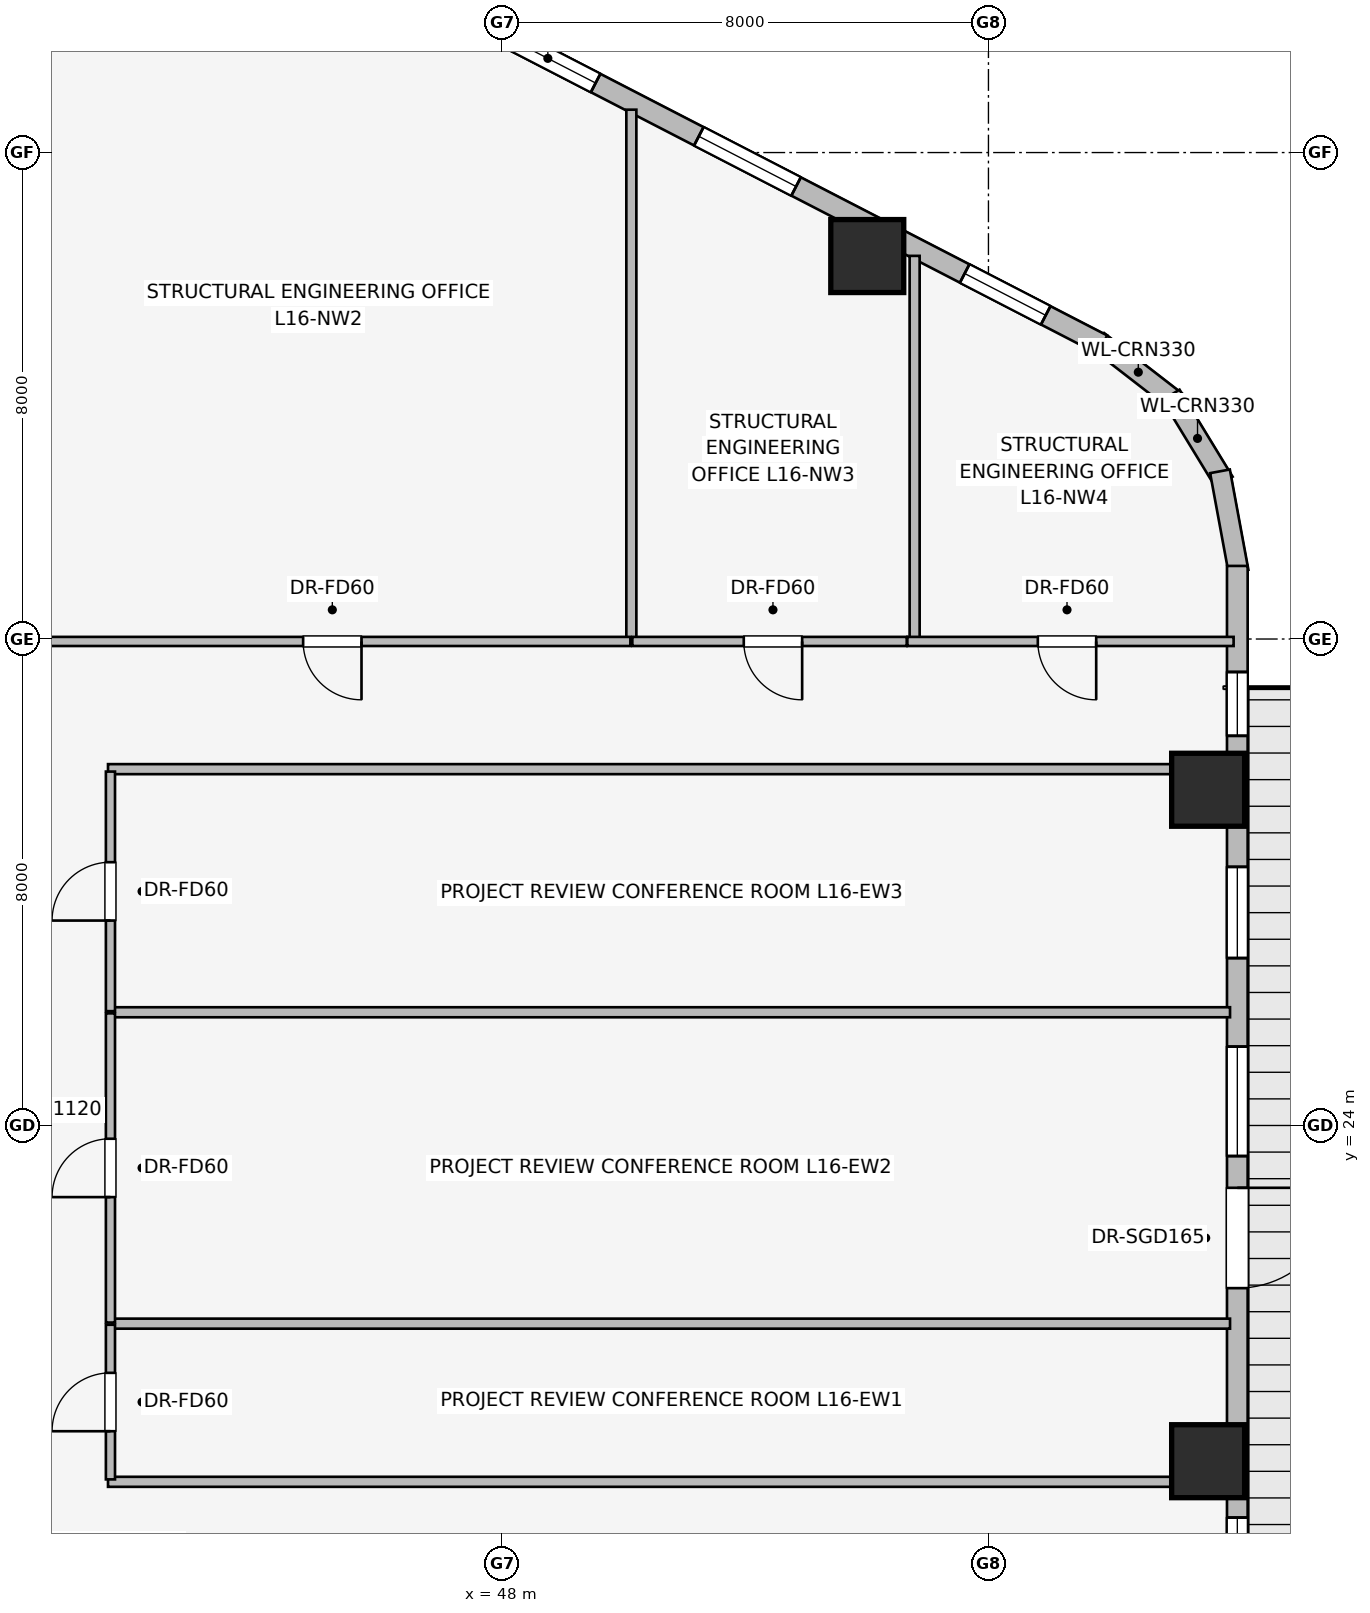
"""IFC4 building model, lengths in metres.
Left out: names, types, materials, properties, quantities, classifications, styles, units other than length and angle.
Written with IfcOpenShell. Run it as: python <this file> out.ifc"""

import sys

from ifc_helpers import new_model, si_unit, direction, frame, frame_2d, origin, origin_2d, place, context, subcontext, project, spatial, rectangle, extrude, element, fill, save


model = new_model("IFC4")
c1 = context("Model", 3, precision=1e-05, world=origin(), true_north=direction((0.0, 1.0)))
c2 = subcontext(c1, "Body", "Model", "MODEL_VIEW")
j1 = project(units=[si_unit("LENGTHUNIT", "METRE"), si_unit("PLANEANGLEUNIT", "RADIAN")], contexts=[c1])
p1 = place(None, origin())
s1 = spatial("IfcSite", under=j1, at=p1, CompositionType="ELEMENT")
p2 = place(p1, origin())
s2 = spatial("IfcBuilding", under=s1, at=p2, CompositionType="ELEMENT")
p3 = place(p2, frame((0.0, 0.0, 63.5)))
s3 = spatial("IfcBuildingStorey", under=s2, at=p3, CompositionType="ELEMENT", Elevation=63.5)
for number, where, z_axis, x_axis in (
    (1, (54.007, 38.298, 0.0), (0.0, 0.0, 1.0), (1.0, 0.0, 0.0)),
    (2, (59.613, 18.479, 0.0), (0.0, 0.0, 1.0), (1.0, 0.0, 0.0)),
    (3, (59.613, 29.521, 0.0), (0.0, 0.0, 1.0), (1.0, 0.0, 0.0)),
):
    element("IfcColumn", number, at=place(p3, frame(where, z_axis=z_axis, x_axis=x_axis)), inside=s3, PredefinedType="COLUMN", context=c2, shape_type="SweptSolid", body=[
        extrude(rectangle(XDim=1.2, YDim=1.2, at=origin_2d()), origin(), (0.0, 0.0, 1.0), 3.65),
    ])
p4 = place(p3, frame((57.802, 36.901, 0.0), z_axis=(0.0, 0.0, 1.0), x_axis=(0.790691856293, -0.61221433207, 0.0)))
e4 = element("IfcWall", 4, at=p4, inside=s3, PredefinedType="STANDARD", context=c2, shape_type="SweptSolid", body=[
    extrude(rectangle(XDim=1.676, YDim=0.33, at=frame_2d((0.838, 0.0))), origin(), (0.0, 0.0, 1.0), 3.39),
])
p5 = place(p3, frame((59.002, 36.015, 0.0), z_axis=(0.0, 0.0, 1.0), x_axis=(0.520584129191, -0.853810379671, 0.0)))
e5 = element("IfcWall", 5, at=p5, inside=s3, PredefinedType="STANDARD", context=c2, shape_type="SweptSolid", body=[
    extrude(rectangle(XDim=1.677, YDim=0.33, at=frame_2d((0.838, 0.0))), origin(), (0.0, 0.0, 1.0), 3.39),
])
p6 = place(p3, frame((59.808, 34.758, 0.0), z_axis=(0.0, 0.0, 1.0), x_axis=(0.181714143354, -0.983351397063, 0.0)))
e6 = element("IfcWall", 6, at=p6, inside=s3, PredefinedType="STANDARD", context=c2, shape_type="SweptSolid", body=[
    extrude(rectangle(XDim=1.678, YDim=0.33, at=frame_2d((0.839, 0.0))), origin(), (0.0, 0.0, 1.0), 3.39),
])
p7 = place(p3, frame((39.631, 46.257, 0.0), z_axis=(0.0, 0.0, 1.0), x_axis=(0.888634413993, -0.458616264721, 0.0)))
e7 = element("IfcWall", 7, at=p7, inside=s3, PredefinedType="STANDARD", context=c2, shape_type="SweptSolid", body=[
    extrude(rectangle(XDim=20.531, YDim=0.34, at=frame_2d((10.266, 0.0))), origin(), (0.0, 0.0, 1.0), 2.684),
])
p8 = place(p7, frame((1.367, 0.0, 0.75)))
e8 = element("IfcOpeningElement", 8, at=p8, cuts=e7, PredefinedType="OPENING", context=c2, shape_type="SweptSolid", body=[
    extrude(rectangle(XDim=1.8, YDim=1.5, at=frame_2d((0.9, 0.75))), frame((0.0, 0.18, 0.0), z_axis=(0.0, -1.0, 0.0), x_axis=(1.0, 0.0, 0.0)), (0.0, 0.0, 1.0), 0.36),
])
p9 = place(p7, frame((5.207, 0.0, 0.75)))
e9 = element("IfcOpeningElement", 9, at=p9, cuts=e7, PredefinedType="OPENING", context=c2, shape_type="SweptSolid", body=[
    extrude(rectangle(XDim=1.5, YDim=1.5, at=frame_2d((0.75, 0.75))), frame((0.0, 0.18, 0.0), z_axis=(0.0, -1.0, 0.0), x_axis=(1.0, 0.0, 0.0)), (0.0, 0.0, 1.0), 0.36),
])
p10 = place(p7, frame((7.429, 0.0, 0.75)))
e10 = element("IfcOpeningElement", 10, at=p10, cuts=e7, PredefinedType="OPENING", context=c2, shape_type="SweptSolid", body=[
    extrude(rectangle(XDim=1.5, YDim=1.5, at=frame_2d((0.75, 0.75))), frame((0.0, 0.18, 0.0), z_axis=(0.0, -1.0, 0.0), x_axis=(1.0, 0.0, 0.0)), (0.0, 0.0, 1.0), 0.36),
])
p11 = place(p7, frame((9.65, 0.0, 0.75)))
e11 = element("IfcOpeningElement", 11, at=p11, cuts=e7, PredefinedType="OPENING", context=c2, shape_type="SweptSolid", body=[
    extrude(rectangle(XDim=1.5, YDim=1.5, at=frame_2d((0.75, 0.75))), frame((0.0, 0.18, 0.0), z_axis=(0.0, -1.0, 0.0), x_axis=(1.0, 0.0, 0.0)), (0.0, 0.0, 1.0), 0.36),
])
p12 = place(p7, frame((13.06, 0.0, 0.75)))
e12 = element("IfcOpeningElement", 12, at=p12, cuts=e7, PredefinedType="OPENING", context=c2, shape_type="SweptSolid", body=[
    extrude(rectangle(XDim=1.8, YDim=1.5, at=frame_2d((0.9, 0.75))), frame((0.0, 0.18, 0.0), z_axis=(0.0, -1.0, 0.0), x_axis=(1.0, 0.0, 0.0)), (0.0, 0.0, 1.0), 0.36),
])
p13 = place(p7, frame((17.98, 0.0, 0.75)))
e13 = element("IfcOpeningElement", 13, at=p13, cuts=e7, PredefinedType="OPENING", context=c2, shape_type="SweptSolid", body=[
    extrude(rectangle(XDim=1.5, YDim=1.5, at=frame_2d((0.75, 0.75))), frame((0.0, 0.18, 0.0), z_axis=(0.0, -1.0, 0.0), x_axis=(1.0, 0.0, 0.0)), (0.0, 0.0, 1.0), 0.36),
])
p14 = place(p3, frame((60.093, 33.202, 0.0), z_axis=(0.0, 0.0, 1.0), x_axis=(0.0, -1.0, 0.0)))
e14 = element("IfcWall", 14, at=p14, inside=s3, PredefinedType="STANDARD", context=c2, shape_type="SweptSolid", body=[
    extrude(rectangle(XDim=18.404, YDim=0.34, at=frame_2d((9.202, 0.0))), origin(), (0.0, 0.0, 1.0), 2.684),
])
p15 = place(p14, frame((10.227, 0.0, 0.0)))
e15 = element("IfcOpeningElement", 15, at=p15, cuts=e14, PredefinedType="OPENING", context=c2, shape_type="SweptSolid", body=[
    extrude(rectangle(XDim=1.65, YDim=2.25, at=frame_2d((0.825, 1.125))), frame((0.0, 0.18, 0.0), z_axis=(0.0, -1.0, 0.0), x_axis=(1.0, 0.0, 0.0)), (0.0, 0.0, 1.0), 0.36),
])
p16 = place(p14, frame((1.744, 0.0, 0.75)))
e16 = element("IfcOpeningElement", 16, at=p16, cuts=e14, PredefinedType="OPENING", context=c2, shape_type="SweptSolid", body=[
    extrude(rectangle(XDim=1.05, YDim=1.4, at=frame_2d((0.525, 0.7))), frame((0.0, 0.18, 0.0), z_axis=(0.0, -1.0, 0.0), x_axis=(1.0, 0.0, 0.0)), (0.0, 0.0, 1.0), 0.36),
])
p17 = place(p14, frame((4.949, 0.0, 0.75)))
e17 = element("IfcOpeningElement", 17, at=p17, cuts=e14, PredefinedType="OPENING", context=c2, shape_type="SweptSolid", body=[
    extrude(rectangle(XDim=1.5, YDim=1.5, at=frame_2d((0.75, 0.75))), frame((0.0, 0.18, 0.0), z_axis=(0.0, -1.0, 0.0), x_axis=(1.0, 0.0, 0.0)), (0.0, 0.0, 1.0), 0.36),
])
p18 = place(p14, frame((7.905, 0.0, 0.75)))
e18 = element("IfcOpeningElement", 18, at=p18, cuts=e14, PredefinedType="OPENING", context=c2, shape_type="SweptSolid", body=[
    extrude(rectangle(XDim=1.8, YDim=1.5, at=frame_2d((0.9, 0.75))), frame((0.0, 0.18, 0.0), z_axis=(0.0, -1.0, 0.0), x_axis=(1.0, 0.0, 0.0)), (0.0, 0.0, 1.0), 0.36),
])
p19 = place(p14, frame((15.65, 0.0, 0.75)))
e19 = element("IfcOpeningElement", 19, at=p19, cuts=e14, PredefinedType="OPENING", context=c2, shape_type="SweptSolid", body=[
    extrude(rectangle(XDim=1.05, YDim=1.4, at=frame_2d((0.525, 0.7))), frame((0.0, 0.18, 0.0), z_axis=(0.0, -1.0, 0.0), x_axis=(1.0, 0.0, 0.0)), (0.0, 0.0, 1.0), 0.36),
])
p20 = place(p3, frame((50.127, 31.97, 0.0), z_axis=(0.0, 0.0, 1.0), x_axis=(0.0, 1.0, 0.0)))
e20 = element("IfcWall", 20, at=p20, inside=s3, PredefinedType="PARTITIONING", context=c2, shape_type="SweptSolid", body=[
    extrude(rectangle(XDim=8.735, YDim=0.165, at=frame_2d((4.368, 0.0))), origin(), (0.0, 0.0, 1.0), 3.39),
])
p21 = place(p3, frame((54.786, 31.97, 0.0), z_axis=(0.0, 0.0, 1.0), x_axis=(0.0, 1.0, 0.0)))
e21 = element("IfcWall", 21, at=p21, inside=s3, PredefinedType="PARTITIONING", context=c2, shape_type="SweptSolid", body=[
    extrude(rectangle(XDim=6.331, YDim=0.165, at=frame_2d((3.166, 0.0))), origin(), (0.0, 0.0, 1.0), 3.39),
])
p22 = place(p3, frame((50.111, 31.96, 0.0), z_axis=(0.0, 0.0, 1.0), x_axis=(-1.0, 0.0, 0.0)))
e22 = element("IfcWall", 22, at=p22, inside=s3, PredefinedType="PARTITIONING", context=c2, shape_type="SweptSolid", body=[
    extrude(rectangle(XDim=9.689, YDim=0.15, at=frame_2d((4.844, 0.0))), origin(), (0.0, 0.0, 1.0), 3.39),
])
p23 = place(p22, frame((4.422, 0.0, 0.0)))
e23 = element("IfcOpeningElement", 23, at=p23, cuts=e22, PredefinedType="OPENING", context=c2, shape_type="SweptSolid", body=[
    extrude(rectangle(XDim=0.96, YDim=2.0, at=frame_2d((0.48, 1.0))), frame((0.0, 0.085, 0.0), z_axis=(0.0, -1.0, 0.0), x_axis=(1.0, 0.0, 0.0)), (0.0, 0.0, 1.0), 0.17),
])
p24 = place(p3, frame((54.656, 31.96, 0.0), z_axis=(0.0, 0.0, 1.0), x_axis=(-1.0, 0.0, 0.0)))
e24 = element("IfcWall", 24, at=p24, inside=s3, PredefinedType="PARTITIONING", context=c2, shape_type="SweptSolid", body=[
    extrude(rectangle(XDim=4.513, YDim=0.15, at=frame_2d((2.256, 0.0))), origin(), (0.0, 0.0, 1.0), 3.39),
])
p25 = place(p24, frame((1.72, 0.0, 0.0)))
e25 = element("IfcOpeningElement", 25, at=p25, cuts=e24, PredefinedType="OPENING", context=c2, shape_type="SweptSolid", body=[
    extrude(rectangle(XDim=0.96, YDim=2.0, at=frame_2d((0.48, 1.0))), frame((0.0, 0.085, 0.0), z_axis=(0.0, -1.0, 0.0), x_axis=(1.0, 0.0, 0.0)), (0.0, 0.0, 1.0), 0.17),
])
p26 = place(p3, frame((60.032, 31.96, 0.0), z_axis=(0.0, 0.0, 1.0), x_axis=(-1.0, 0.0, 0.0)))
e26 = element("IfcWall", 26, at=p26, inside=s3, PredefinedType="PARTITIONING", context=c2, shape_type="SweptSolid", body=[
    extrude(rectangle(XDim=5.366, YDim=0.15, at=frame_2d((2.683, 0.0))), origin(), (0.0, 0.0, 1.0), 3.39),
])
p27 = place(p26, frame((2.26, 0.0, 0.0)))
e27 = element("IfcOpeningElement", 27, at=p27, cuts=e26, PredefinedType="OPENING", context=c2, shape_type="SweptSolid", body=[
    extrude(rectangle(XDim=0.96, YDim=2.0, at=frame_2d((0.48, 1.0))), frame((0.0, 0.085, 0.0), z_axis=(0.0, -1.0, 0.0), x_axis=(1.0, 0.0, 0.0)), (0.0, 0.0, 1.0), 0.17),
])
for number, where, z_axis, x_axis in (
    (28, (41.52, 18.14, 0.0), (0.0, 0.0, 1.0), (1.0, 0.0, 0.0)),
    (29, (41.52, 29.86, 0.0), (0.0, 0.0, 1.0), (1.0, 0.0, 0.0)),
):
    element("IfcWall", number, at=place(p3, frame(where, z_axis=z_axis, x_axis=x_axis)), inside=s3, PredefinedType="PARTITIONING", context=c2, shape_type="SweptSolid", body=[
        extrude(rectangle(XDim=18.453, YDim=0.165, at=frame_2d((9.227, 0.0))), origin(), (0.0, 0.0, 1.0), 3.39),
    ])
for number, where, z_axis, x_axis in (
    (30, (41.59, 20.741, 0.0), (0.0, 0.0, 1.0), (1.0, 0.0, 0.0)),
    (31, (41.59, 25.862, 0.0), (0.0, 0.0, 1.0), (1.0, 0.0, 0.0)),
):
    element("IfcWall", number, at=place(p3, frame(where, z_axis=z_axis, x_axis=x_axis)), inside=s3, PredefinedType="PARTITIONING", context=c2, shape_type="SweptSolid", body=[
        extrude(rectangle(XDim=18.383, YDim=0.165, at=frame_2d((9.191, 0.0))), origin(), (0.0, 0.0, 1.0), 3.39),
    ])
p28 = place(p3, frame((41.56, 18.18, 0.0), z_axis=(0.0, 0.0, 1.0), x_axis=(0.0, 1.0, 0.0)))
e32 = element("IfcWall", 32, at=p28, inside=s3, PredefinedType="PARTITIONING", context=c2, shape_type="SweptSolid", body=[
    extrude(rectangle(XDim=2.543, YDim=0.15, at=frame_2d((1.271, 0.0))), origin(), (0.0, 0.0, 1.0), 3.39),
])
p29 = place(p28, frame((0.792, 0.0, 0.0)))
e33 = element("IfcOpeningElement", 33, at=p29, cuts=e32, PredefinedType="OPENING", context=c2, shape_type="SweptSolid", body=[
    extrude(rectangle(XDim=0.96, YDim=2.0, at=frame_2d((0.48, 1.0))), frame((0.0, 0.085, 0.0), z_axis=(0.0, -1.0, 0.0), x_axis=(1.0, 0.0, 0.0)), (0.0, 0.0, 1.0), 0.17),
])
p30 = place(p3, frame((41.56, 20.759, 0.0), z_axis=(0.0, 0.0, 1.0), x_axis=(0.0, 1.0, 0.0)))
e34 = element("IfcWall", 34, at=p30, inside=s3, PredefinedType="PARTITIONING", context=c2, shape_type="SweptSolid", body=[
    extrude(rectangle(XDim=5.085, YDim=0.15, at=frame_2d((2.542, 0.0))), origin(), (0.0, 0.0, 1.0), 3.39),
])
p31 = place(p30, frame((2.063, 0.0, 0.0)))
e35 = element("IfcOpeningElement", 35, at=p31, cuts=e34, PredefinedType="OPENING", context=c2, shape_type="SweptSolid", body=[
    extrude(rectangle(XDim=0.96, YDim=2.0, at=frame_2d((0.48, 1.0))), frame((0.0, 0.085, 0.0), z_axis=(0.0, -1.0, 0.0), x_axis=(1.0, 0.0, 0.0)), (0.0, 0.0, 1.0), 0.17),
])
p32 = place(p3, frame((41.56, 25.88, 0.0), z_axis=(0.0, 0.0, 1.0), x_axis=(0.0, 1.0, 0.0)))
e36 = element("IfcWall", 36, at=p32, inside=s3, PredefinedType="PARTITIONING", context=c2, shape_type="SweptSolid", body=[
    extrude(rectangle(XDim=3.94, YDim=0.15, at=frame_2d((1.97, 0.0))), origin(), (0.0, 0.0, 1.0), 3.39),
])
p33 = place(p32, frame((1.49, 0.0, 0.0)))
e37 = element("IfcOpeningElement", 37, at=p33, cuts=e36, PredefinedType="OPENING", context=c2, shape_type="SweptSolid", body=[
    extrude(rectangle(XDim=0.96, YDim=2.0, at=frame_2d((0.48, 1.0))), frame((0.0, 0.085, 0.0), z_axis=(0.0, -1.0, 0.0), x_axis=(1.0, 0.0, 0.0)), (0.0, 0.0, 1.0), 0.17),
])
p34 = place(p11, origin())
e38 = element("IfcWindow", 38, at=p34, inside=s3, PartitioningType="SINGLE_PANEL", PredefinedType="WINDOW", context=c2, shape_type="SweptSolid", body=[
    extrude(rectangle(XDim=1.5, YDim=1.5, at=frame_2d((0.75, 0.75))), frame((0.0, 0.03, 0.0), z_axis=(0.0, -1.0, 0.0), x_axis=(1.0, 0.0, 0.0)), (0.0, 0.0, 1.0), 0.06),
])
fill(e11, e38)
p35 = place(p12, origin())
e39 = element("IfcWindow", 39, at=p35, inside=s3, PartitioningType="SINGLE_PANEL", PredefinedType="WINDOW", context=c2, shape_type="SweptSolid", body=[
    extrude(rectangle(XDim=1.8, YDim=1.5, at=frame_2d((0.9, 0.75))), frame((0.0, 0.03, 0.0), z_axis=(0.0, -1.0, 0.0), x_axis=(1.0, 0.0, 0.0)), (0.0, 0.0, 1.0), 0.06),
])
fill(e12, e39)
p36 = place(p13, origin())
e40 = element("IfcWindow", 40, at=p36, inside=s3, PartitioningType="SINGLE_PANEL", PredefinedType="WINDOW", context=c2, shape_type="SweptSolid", body=[
    extrude(rectangle(XDim=1.5, YDim=1.5, at=frame_2d((0.75, 0.75))), frame((0.0, 0.03, 0.0), z_axis=(0.0, -1.0, 0.0), x_axis=(1.0, 0.0, 0.0)), (0.0, 0.0, 1.0), 0.06),
])
fill(e13, e40)
p37 = place(p15, origin())
e41 = element("IfcDoor", 41, at=p37, inside=s3, OperationType="SINGLE_SWING_LEFT", PredefinedType="DOOR", context=c2, shape_type="SweptSolid", body=[
    extrude(rectangle(XDim=1.65, YDim=2.25, at=frame_2d((0.825, 1.125))), frame((0.0, 0.025, 0.0), z_axis=(0.0, -1.0, 0.0), x_axis=(1.0, 0.0, 0.0)), (0.0, 0.0, 1.0), 0.05),
])
fill(e15, e41)
p38 = place(p16, origin())
e42 = element("IfcWindow", 42, at=p38, inside=s3, PartitioningType="SINGLE_PANEL", PredefinedType="WINDOW", context=c2, shape_type="SweptSolid", body=[
    extrude(rectangle(XDim=1.05, YDim=1.4, at=frame_2d((0.525, 0.7))), frame((0.0, 0.03, 0.0), z_axis=(0.0, -1.0, 0.0), x_axis=(1.0, 0.0, 0.0)), (0.0, 0.0, 1.0), 0.06),
])
fill(e16, e42)
p39 = place(p17, origin())
e43 = element("IfcWindow", 43, at=p39, inside=s3, PartitioningType="SINGLE_PANEL", PredefinedType="WINDOW", context=c2, shape_type="SweptSolid", body=[
    extrude(rectangle(XDim=1.5, YDim=1.5, at=frame_2d((0.75, 0.75))), frame((0.0, 0.03, 0.0), z_axis=(0.0, -1.0, 0.0), x_axis=(1.0, 0.0, 0.0)), (0.0, 0.0, 1.0), 0.06),
])
fill(e17, e43)
p40 = place(p18, origin())
e44 = element("IfcWindow", 44, at=p40, inside=s3, PartitioningType="SINGLE_PANEL", PredefinedType="WINDOW", context=c2, shape_type="SweptSolid", body=[
    extrude(rectangle(XDim=1.8, YDim=1.5, at=frame_2d((0.9, 0.75))), frame((0.0, 0.03, 0.0), z_axis=(0.0, -1.0, 0.0), x_axis=(1.0, 0.0, 0.0)), (0.0, 0.0, 1.0), 0.06),
])
fill(e18, e44)
p41 = place(p19, origin())
e45 = element("IfcWindow", 45, at=p41, inside=s3, PartitioningType="SINGLE_PANEL", PredefinedType="WINDOW", context=c2, shape_type="SweptSolid", body=[
    extrude(rectangle(XDim=1.05, YDim=1.4, at=frame_2d((0.525, 0.7))), frame((0.0, 0.03, 0.0), z_axis=(0.0, -1.0, 0.0), x_axis=(1.0, 0.0, 0.0)), (0.0, 0.0, 1.0), 0.06),
])
fill(e19, e45)
p42 = place(p23, origin())
e46 = element("IfcDoor", 46, at=p42, inside=s3, OperationType="SINGLE_SWING_LEFT", PredefinedType="DOOR", context=c2, shape_type="SweptSolid", body=[
    extrude(rectangle(XDim=0.96, YDim=2.0, at=frame_2d((0.48, 1.0))), frame((0.0, 0.025, 0.0), z_axis=(0.0, -1.0, 0.0), x_axis=(1.0, 0.0, 0.0)), (0.0, 0.0, 1.0), 0.05),
])
fill(e23, e46)
p43 = place(p25, origin())
e47 = element("IfcDoor", 47, at=p43, inside=s3, OperationType="SINGLE_SWING_LEFT", PredefinedType="DOOR", context=c2, shape_type="SweptSolid", body=[
    extrude(rectangle(XDim=0.96, YDim=2.0, at=frame_2d((0.48, 1.0))), frame((0.0, 0.025, 0.0), z_axis=(0.0, -1.0, 0.0), x_axis=(1.0, 0.0, 0.0)), (0.0, 0.0, 1.0), 0.05),
])
fill(e25, e47)
p44 = place(p27, origin())
e48 = element("IfcDoor", 48, at=p44, inside=s3, OperationType="SINGLE_SWING_LEFT", PredefinedType="DOOR", context=c2, shape_type="SweptSolid", body=[
    extrude(rectangle(XDim=0.96, YDim=2.0, at=frame_2d((0.48, 1.0))), frame((0.0, 0.025, 0.0), z_axis=(0.0, -1.0, 0.0), x_axis=(1.0, 0.0, 0.0)), (0.0, 0.0, 1.0), 0.05),
])
fill(e27, e48)
p45 = place(p29, origin())
e49 = element("IfcDoor", 49, at=p45, inside=s3, OperationType="SINGLE_SWING_LEFT", PredefinedType="DOOR", context=c2, shape_type="SweptSolid", body=[
    extrude(rectangle(XDim=0.96, YDim=2.0, at=frame_2d((0.48, 1.0))), frame((0.0, 0.025, 0.0), z_axis=(0.0, -1.0, 0.0), x_axis=(1.0, 0.0, 0.0)), (0.0, 0.0, 1.0), 0.05),
])
fill(e33, e49)
p46 = place(p31, origin())
e50 = element("IfcDoor", 50, at=p46, inside=s3, OperationType="SINGLE_SWING_LEFT", PredefinedType="DOOR", context=c2, shape_type="SweptSolid", body=[
    extrude(rectangle(XDim=0.96, YDim=2.0, at=frame_2d((0.48, 1.0))), frame((0.0, 0.025, 0.0), z_axis=(0.0, -1.0, 0.0), x_axis=(1.0, 0.0, 0.0)), (0.0, 0.0, 1.0), 0.05),
])
fill(e35, e50)
p47 = place(p33, origin())
e51 = element("IfcDoor", 51, at=p47, inside=s3, OperationType="SINGLE_SWING_LEFT", PredefinedType="DOOR", context=c2, shape_type="SweptSolid", body=[
    extrude(rectangle(XDim=0.96, YDim=2.0, at=frame_2d((0.48, 1.0))), frame((0.0, 0.025, 0.0), z_axis=(0.0, -1.0, 0.0), x_axis=(1.0, 0.0, 0.0)), (0.0, 0.0, 1.0), 0.05),
])
fill(e37, e51)
save(model, sys.argv[1])
